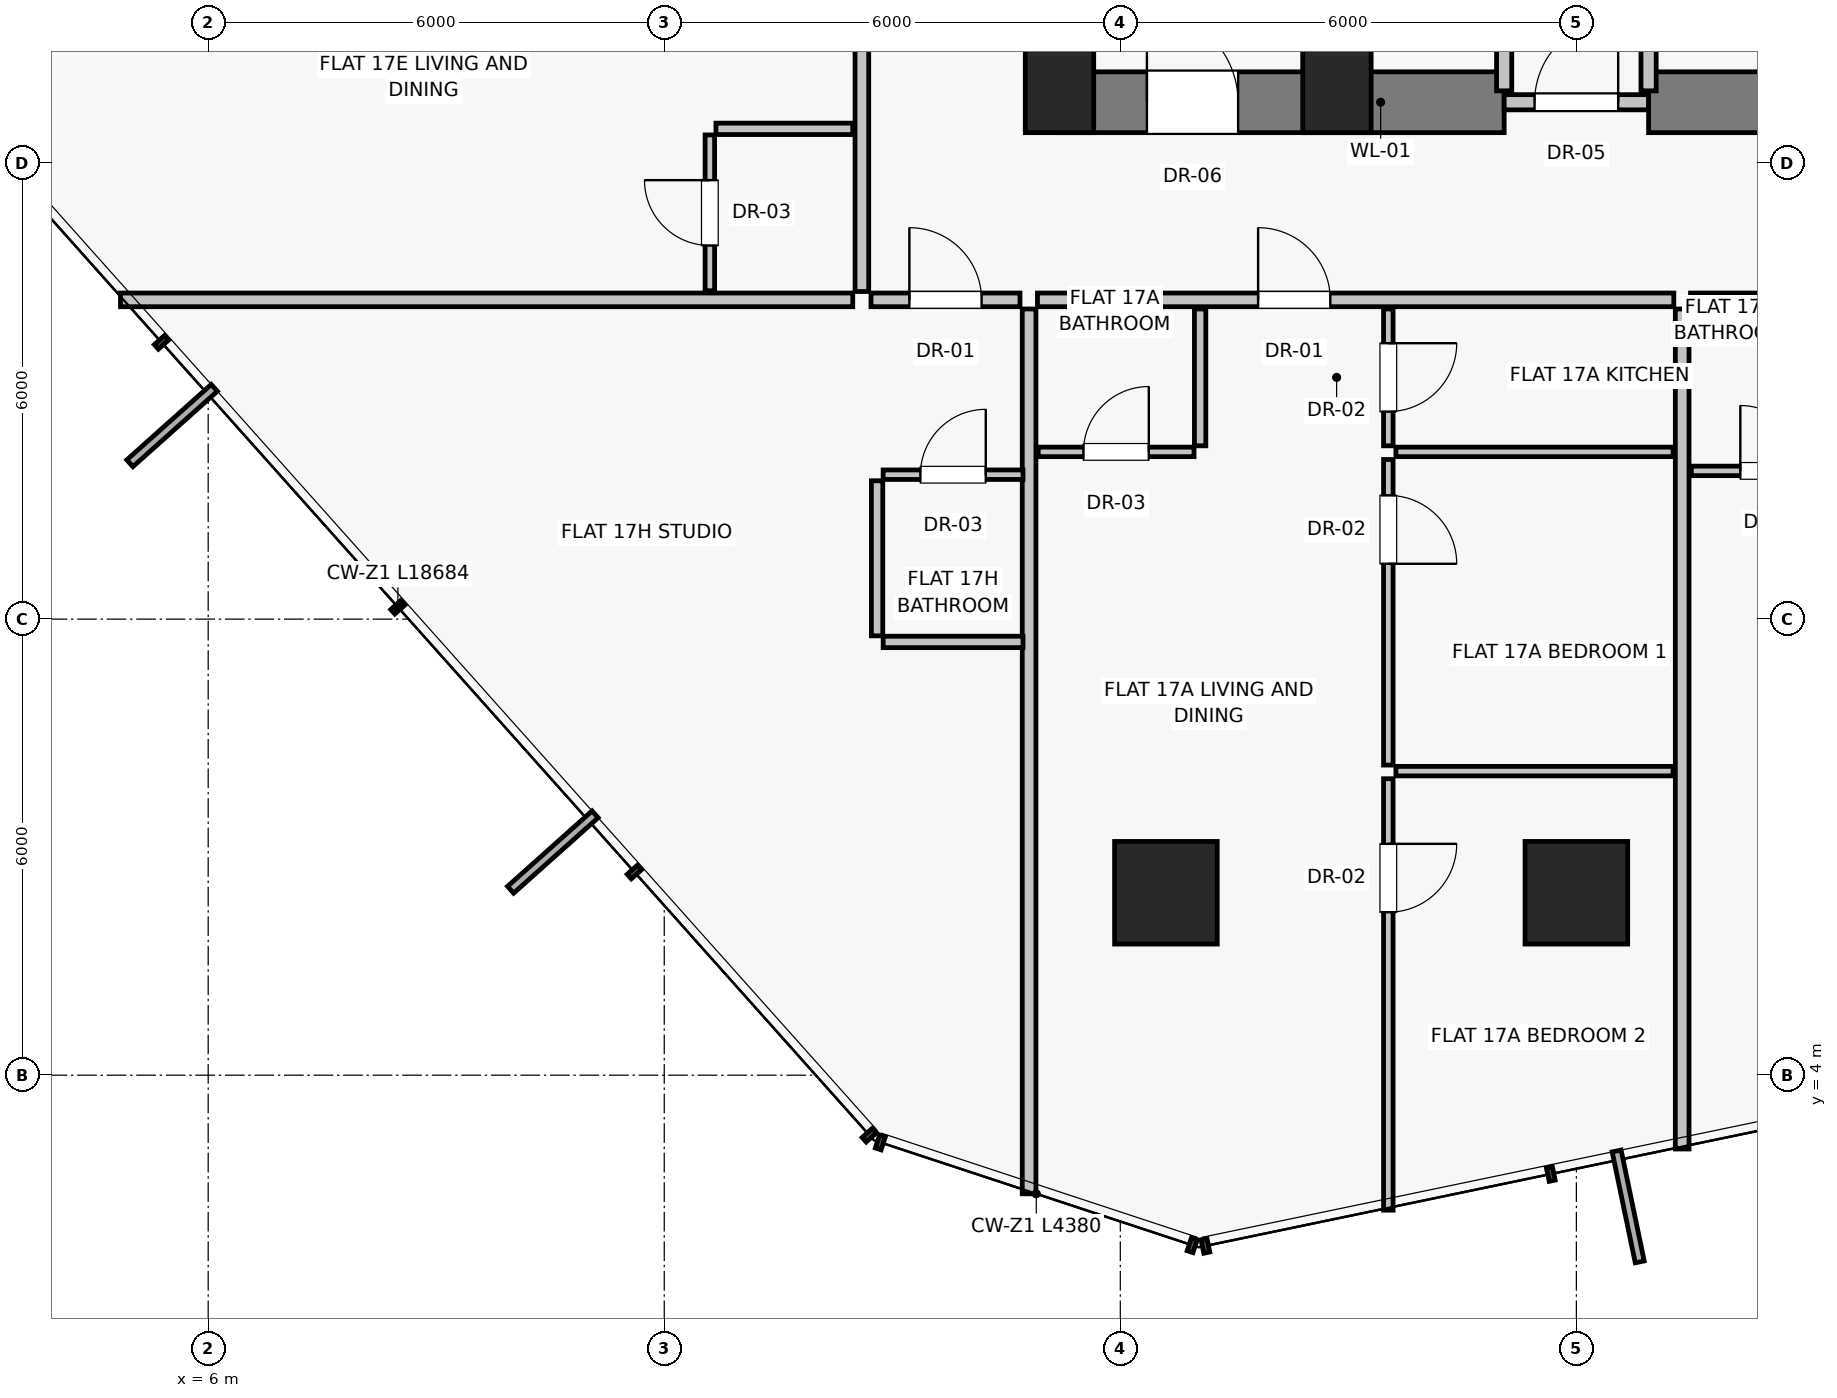
"""IFC4 building model, lengths in metres.
Left out: names, types, materials, properties, quantities, classifications, styles, units other than length and angle.
Written with IfcOpenShell. Run it as: python <this file> out.ifc"""

import sys

from ifc_helpers import new_model, si_unit, direction, frame, frame_2d, origin, origin_2d, place, context, subcontext, project, spatial, rectangle, extrude, source, transform, mapped, element, fill, save


model = new_model("IFC4")
c1 = context("Model", 3, precision=1e-05, world=origin(), true_north=direction((0.0, 1.0)))
c2 = subcontext(c1, "Body", "Model", "MODEL_VIEW")
j1 = project(units=[si_unit("LENGTHUNIT", "METRE"), si_unit("PLANEANGLEUNIT", "RADIAN")], contexts=[c1])
p1 = place(None, origin())
s1 = spatial("IfcSite", under=j1, at=p1, CompositionType="ELEMENT")
p2 = place(p1, origin())
s2 = spatial("IfcBuilding", under=s1, at=p2, CompositionType="ELEMENT")
p3 = place(p2, frame((0.0, 0.0, 64.1)))
s3 = spatial("IfcBuildingStorey", under=s2, at=p3, CompositionType="ELEMENT", Elevation=64.1)
for number, where, z_axis, x_axis in (
    (1, (17.2, 17.0, 0.0), (0.0, 0.0, 1.0), (1.0, 0.0, 0.0)),
    (2, (20.85, 17.0, 0.0), (0.0, 0.0, 1.0), (1.0, 0.0, 0.0)),
):
    element("IfcColumn", number, at=place(p3, frame(where, z_axis=z_axis, x_axis=x_axis)), inside=s3, PredefinedType="PILASTER", context=c2, shape_type="SweptSolid", body=[
        extrude(rectangle(XDim=0.9, YDim=1.2, at=origin_2d()), origin(), (0.0, 0.0, 1.0), 3.25),
    ])
for number, where, z_axis, x_axis in (
    (3, (18.6, 6.4, 0.0), (0.0, 0.0, 1.0), (1.0, 0.0, 0.0)),
    (4, (24.0, 6.4, 0.0), (0.0, 0.0, 1.0), (1.0, 0.0, 0.0)),
):
    element("IfcColumn", number, at=place(p3, frame(where, z_axis=z_axis, x_axis=x_axis)), inside=s3, PredefinedType="COLUMN", context=c2, shape_type="SweptSolid", body=[
        extrude(rectangle(XDim=1.35, YDim=1.35, at=origin_2d()), origin(), (0.0, 0.0, 1.0), 3.25),
    ])
p4 = place(p3, frame((17.2, 16.8, 0.0), z_axis=(0.0, 0.0, 1.0), x_axis=(0.0, 1.0, 0.0)))
e5 = element("IfcWall", 5, at=p4, inside=s3, PredefinedType="SHEAR", context=c2, shape_type="SweptSolid", body=[
    extrude(rectangle(XDim=14.2, YDim=0.8, at=frame_2d((7.1, 0.0))), origin(), (0.0, 0.0, 1.0), 3.0),
])
p5 = place(p3, frame((17.2, 16.8, 0.0), z_axis=(0.0, 0.0, 1.0), x_axis=(1.0, 0.0, 0.0)))
e6 = element("IfcWall", 6, at=p5, inside=s3, PredefinedType="SHEAR", context=c2, shape_type="SweptSolid", body=[
    extrude(rectangle(XDim=5.85, YDim=0.8, at=frame_2d((2.925, 0.0))), origin(), (0.0, 0.0, 1.0), 3.0),
])
p6 = place(p5, frame((1.15, 0.0, 0.0)))
e7 = element("IfcOpeningElement", 7, at=p6, cuts=e6, PredefinedType="OPENING", context=c2, shape_type="SweptSolid", body=[
    extrude(rectangle(XDim=1.2, YDim=2.03, at=frame_2d((0.6, 1.015))), frame((0.0, 0.41, 0.0), z_axis=(0.0, -1.0, 0.0), x_axis=(1.0, 0.0, 0.0)), (0.0, 0.0, 1.0), 0.82),
])
p7 = place(p3, frame((23.05, 16.8, 0.0), z_axis=(0.0, 0.0, 1.0), x_axis=(1.0, 0.0, 0.0)))
e8 = element("IfcWall", 8, at=p7, inside=s3, PredefinedType="SOLIDWALL", context=c2, shape_type="SweptSolid", body=[
    extrude(rectangle(XDim=1.9, YDim=0.2, at=frame_2d((0.95, 0.0))), origin(), (0.0, 0.0, 1.0), 2.15),
])
p8 = place(p7, frame((0.4, 0.0, 0.0)))
e9 = element("IfcOpeningElement", 9, at=p8, cuts=e8, PredefinedType="OPENING", context=c2, shape_type="SweptSolid", body=[
    extrude(rectangle(XDim=1.1, YDim=2.03, at=frame_2d((0.55, 1.015))), frame((0.0, 0.11, 0.0), z_axis=(0.0, -1.0, 0.0), x_axis=(1.0, 0.0, 0.0)), (0.0, 0.0, 1.0), 0.22),
])
p9 = place(p3, frame((24.95, 16.8, 0.0), z_axis=(0.0, 0.0, 1.0), x_axis=(1.0, 0.0, 0.0)))
e10 = element("IfcWall", 10, at=p9, inside=s3, PredefinedType="SHEAR", context=c2, shape_type="SweptSolid", body=[
    extrude(rectangle(XDim=5.85, YDim=0.8, at=frame_2d((2.925, 0.0))), origin(), (0.0, 0.0, 1.0), 3.0),
])
p10 = place(p9, frame((2.15, 0.0, 0.0)))
e11 = element("IfcOpeningElement", 11, at=p10, cuts=e10, PredefinedType="OPENING", context=c2, shape_type="SweptSolid", body=[
    extrude(rectangle(XDim=1.2, YDim=2.03, at=frame_2d((0.6, 1.015))), frame((0.0, 0.41, 0.0), z_axis=(0.0, -1.0, 0.0), x_axis=(1.0, 0.0, 0.0)), (0.0, 0.0, 1.0), 0.82),
])
for number, where, z_axis, x_axis in (
    (12, (23.05, 16.95, 0.0), (0.0, 0.0, 1.0), (0.0, 1.0, 0.0)),
    (13, (24.95, 16.95, 0.0), (0.0, 0.0, 1.0), (0.0, 1.0, 0.0)),
):
    element("IfcWall", number, at=place(p3, frame(where, z_axis=z_axis, x_axis=x_axis)), inside=s3, PredefinedType="SOLIDWALL", context=c2, shape_type="SweptSolid", body=[
        extrude(rectangle(XDim=5.6, YDim=0.2, at=frame_2d((2.8, 0.0))), origin(), (0.0, 0.0, 1.0), 3.0),
    ])
p11 = place(p3, frame((16.8, 14.08, 0.0), z_axis=(0.0, 0.0, 1.0), x_axis=(0.0, -1.0, 0.0)))
e14 = element("IfcWall", 14, at=p11, inside=s3, PredefinedType="PARTITIONING", context=c2, shape_type="SweptSolid", body=[
    extrude(rectangle(XDim=11.641, YDim=0.18, at=frame_2d((5.82, 0.0))), origin(), (0.0, 0.0, 1.0), 3.0),
])
p12 = place(p3, frame((16.91, 14.2, 0.0), z_axis=(0.0, 0.0, 1.0), x_axis=(1.0, 0.0, 0.0)))
e15 = element("IfcWall", 15, at=p12, inside=s3, PredefinedType="PARTITIONING", context=c2, shape_type="SweptSolid", body=[
    extrude(rectangle(XDim=8.372, YDim=0.18, at=frame_2d((4.186, 0.0))), origin(), (0.0, 0.0, 1.0), 3.0),
])
p13 = place(p12, frame((2.903, 0.0, 0.0)))
e16 = element("IfcOpeningElement", 16, at=p13, cuts=e15, PredefinedType="OPENING", context=c2, shape_type="SweptSolid", body=[
    extrude(rectangle(XDim=0.95, YDim=2.02, at=frame_2d((0.475, 1.01))), frame((0.0, 0.1, 0.0), z_axis=(0.0, -1.0, 0.0), x_axis=(1.0, 0.0, 0.0)), (0.0, 0.0, 1.0), 0.2),
])
p14 = place(p3, frame((19.05, 14.08, 0.0), z_axis=(0.0, 0.0, 1.0), x_axis=(0.0, -1.0, 0.0)))
e17 = element("IfcWall", 17, at=p14, inside=s3, PredefinedType="PARTITIONING", context=c2, shape_type="SweptSolid", body=[
    extrude(rectangle(XDim=1.8, YDim=0.15, at=frame_2d((0.9, 0.0))), origin(), (0.0, 0.0, 1.0), 3.0),
])
p15 = place(p3, frame((16.92, 12.2, 0.0), z_axis=(0.0, 0.0, 1.0), x_axis=(1.0, 0.0, 0.0)))
e18 = element("IfcWall", 18, at=p15, inside=s3, PredefinedType="PARTITIONING", context=c2, shape_type="SweptSolid", body=[
    extrude(rectangle(XDim=2.05, YDim=0.125, at=frame_2d((1.025, 0.0))), origin(), (0.0, 0.0, 1.0), 3.0),
])
p16 = place(p15, frame((0.595, 0.0, 0.0)))
e19 = element("IfcOpeningElement", 19, at=p16, cuts=e18, PredefinedType="OPENING", context=c2, shape_type="SweptSolid", body=[
    extrude(rectangle(XDim=0.86, YDim=2.01, at=frame_2d((0.43, 1.005))), frame((0.0, 0.073, 0.0), z_axis=(0.0, -1.0, 0.0), x_axis=(1.0, 0.0, 0.0)), (0.0, 0.0, 1.0), 0.145),
])
p17 = place(p3, frame((21.526, 14.08, 0.0), z_axis=(0.0, 0.0, 1.0), x_axis=(0.0, -1.0, 0.0)))
e20 = element("IfcWall", 20, at=p17, inside=s3, PredefinedType="PARTITIONING", context=c2, shape_type="SweptSolid", body=[
    extrude(rectangle(XDim=1.8, YDim=0.125, at=frame_2d((0.9, 0.0))), origin(), (0.0, 0.0, 1.0), 3.0),
])
p18 = place(p17, frame((0.45, 0.0, 0.0)))
e21 = element("IfcOpeningElement", 21, at=p18, cuts=e20, PredefinedType="OPENING", context=c2, shape_type="SweptSolid", body=[
    extrude(rectangle(XDim=0.9, YDim=2.01, at=frame_2d((0.45, 1.005))), frame((0.0, 0.073, 0.0), z_axis=(0.0, -1.0, 0.0), x_axis=(1.0, 0.0, 0.0)), (0.0, 0.0, 1.0), 0.145),
])
for number, where, z_axis, x_axis in (
    (22, (21.626, 12.2, 0.0), (0.0, 0.0, 1.0), (1.0, 0.0, 0.0)),
    (23, (21.626, 8.0, 0.0), (0.0, 0.0, 1.0), (1.0, 0.0, 0.0)),
):
    element("IfcWall", number, at=place(p3, frame(where, z_axis=z_axis, x_axis=x_axis)), inside=s3, PredefinedType="PARTITIONING", context=c2, shape_type="SweptSolid", body=[
        extrude(rectangle(XDim=3.646, YDim=0.125, at=frame_2d((1.823, 0.0))), origin(), (0.0, 0.0, 1.0), 3.0),
    ])
p19 = place(p3, frame((21.526, 12.1, 0.0), z_axis=(0.0, 0.0, 1.0), x_axis=(0.0, -1.0, 0.0)))
e24 = element("IfcWall", 24, at=p19, inside=s3, PredefinedType="PARTITIONING", context=c2, shape_type="SweptSolid", body=[
    extrude(rectangle(XDim=4.02, YDim=0.125, at=frame_2d((2.01, 0.0))), origin(), (0.0, 0.0, 1.0), 3.0),
])
p20 = place(p19, frame((0.472, 0.0, 0.0)))
e25 = element("IfcOpeningElement", 25, at=p20, cuts=e24, PredefinedType="OPENING", context=c2, shape_type="SweptSolid", body=[
    extrude(rectangle(XDim=0.9, YDim=2.01, at=frame_2d((0.45, 1.005))), frame((0.0, 0.073, 0.0), z_axis=(0.0, -1.0, 0.0), x_axis=(1.0, 0.0, 0.0)), (0.0, 0.0, 1.0), 0.145),
])
p21 = place(p3, frame((21.526, 7.9, 0.0), z_axis=(0.0, 0.0, 1.0), x_axis=(0.0, -1.0, 0.0)))
e26 = element("IfcWall", 26, at=p21, inside=s3, PredefinedType="PARTITIONING", context=c2, shape_type="SweptSolid", body=[
    extrude(rectangle(XDim=5.676, YDim=0.125, at=frame_2d((2.838, 0.0))), origin(), (0.0, 0.0, 1.0), 3.0),
])
p22 = place(p21, frame((0.856, 0.0, 0.0)))
e27 = element("IfcOpeningElement", 27, at=p22, cuts=e26, PredefinedType="OPENING", context=c2, shape_type="SweptSolid", body=[
    extrude(rectangle(XDim=0.9, YDim=2.01, at=frame_2d((0.45, 1.005))), frame((0.0, 0.073, 0.0), z_axis=(0.0, -1.0, 0.0), x_axis=(1.0, 0.0, 0.0)), (0.0, 0.0, 1.0), 0.145),
])
p23 = place(p3, frame((25.392, 14.08, 0.0), z_axis=(0.0, 0.0, 1.0), x_axis=(0.0, -1.0, 0.0)))
e28 = element("IfcWall", 28, at=p23, inside=s3, PredefinedType="PARTITIONING", context=c2, shape_type="SweptSolid", body=[
    extrude(rectangle(XDim=11.051, YDim=0.18, at=frame_2d((5.526, 0.0))), origin(), (0.0, 0.0, 1.0), 3.0),
])
p24 = place(p3, frame((25.502, 14.2, 0.0), z_axis=(0.0, 0.0, 1.0), x_axis=(1.0, 0.0, 0.0)))
e29 = element("IfcWall", 29, at=p24, inside=s3, PredefinedType="PARTITIONING", context=c2, shape_type="SweptSolid", body=[
    extrude(rectangle(XDim=5.588, YDim=0.18, at=frame_2d((2.794, 0.0))), origin(), (0.0, 0.0, 1.0), 3.0),
])
p25 = place(p24, frame((3.336, 0.0, 0.0)))
e30 = element("IfcOpeningElement", 30, at=p25, cuts=e29, PredefinedType="OPENING", context=c2, shape_type="SweptSolid", body=[
    extrude(rectangle(XDim=0.95, YDim=2.02, at=frame_2d((0.475, 1.01))), frame((0.0, 0.1, 0.0), z_axis=(0.0, -1.0, 0.0), x_axis=(1.0, 0.0, 0.0)), (0.0, 0.0, 1.0), 0.2),
])
p26 = place(p3, frame((25.512, 11.95, 0.0), z_axis=(0.0, 0.0, 1.0), x_axis=(1.0, 0.0, 0.0)))
e31 = element("IfcWall", 31, at=p26, inside=s3, PredefinedType="PARTITIONING", context=c2, shape_type="SweptSolid", body=[
    extrude(rectangle(XDim=2.15, YDim=0.125, at=frame_2d((1.075, 0.0))), origin(), (0.0, 0.0, 1.0), 2.58),
])
p27 = place(p26, frame((0.645, 0.0, 0.0)))
e32 = element("IfcOpeningElement", 32, at=p27, cuts=e31, PredefinedType="OPENING", context=c2, shape_type="SweptSolid", body=[
    extrude(rectangle(XDim=0.86, YDim=2.01, at=frame_2d((0.43, 1.005))), frame((0.0, 0.073, 0.0), z_axis=(0.0, -1.0, 0.0), x_axis=(1.0, 0.0, 0.0)), (0.0, 0.0, 1.0), 0.145),
])
p28 = place(p3, frame((14.48, 14.2, 0.0), z_axis=(0.0, 0.0, 1.0), x_axis=(-1.0, 0.0, 0.0)))
e33 = element("IfcWall", 33, at=p28, inside=s3, PredefinedType="PARTITIONING", context=c2, shape_type="SweptSolid", body=[
    extrude(rectangle(XDim=9.634, YDim=0.18, at=frame_2d((4.817, 0.0))), origin(), (0.0, 0.0, 1.0), 3.0),
])
p29 = place(p3, frame((14.6, 14.31, 0.0), z_axis=(0.0, 0.0, 1.0), x_axis=(0.0, 1.0, 0.0)))
e34 = element("IfcWall", 34, at=p29, inside=s3, PredefinedType="PARTITIONING", context=c2, shape_type="SweptSolid", body=[
    extrude(rectangle(XDim=11.438, YDim=0.18, at=frame_2d((5.719, 0.0))), origin(), (0.0, 0.0, 1.0), 3.0),
])
p30 = place(p29, frame((3.804, 0.0, 0.0)))
e35 = element("IfcOpeningElement", 35, at=p30, cuts=e34, PredefinedType="OPENING", context=c2, shape_type="SweptSolid", body=[
    extrude(rectangle(XDim=0.95, YDim=2.02, at=frame_2d((0.475, 1.01))), frame((0.0, 0.1, 0.0), z_axis=(0.0, -1.0, 0.0), x_axis=(1.0, 0.0, 0.0)), (0.0, 0.0, 1.0), 0.2),
])
p31 = place(p3, frame((14.48, 16.45, 0.0), z_axis=(0.0, 0.0, 1.0), x_axis=(-1.0, 0.0, 0.0)))
e36 = element("IfcWall", 36, at=p31, inside=s3, PredefinedType="PARTITIONING", context=c2, shape_type="SweptSolid", body=[
    extrude(rectangle(XDim=1.8, YDim=0.15, at=frame_2d((0.9, 0.0))), origin(), (0.0, 0.0, 1.0), 3.0),
])
p32 = place(p3, frame((12.6, 14.32, 0.0), z_axis=(0.0, 0.0, 1.0), x_axis=(0.0, 1.0, 0.0)))
e37 = element("IfcWall", 37, at=p32, inside=s3, PredefinedType="PARTITIONING", context=c2, shape_type="SweptSolid", body=[
    extrude(rectangle(XDim=2.05, YDim=0.125, at=frame_2d((1.025, 0.0))), origin(), (0.0, 0.0, 1.0), 3.0),
])
p33 = place(p32, frame((0.595, 0.0, 0.0)))
e38 = element("IfcOpeningElement", 38, at=p33, cuts=e37, PredefinedType="OPENING", context=c2, shape_type="SweptSolid", body=[
    extrude(rectangle(XDim=0.86, YDim=2.01, at=frame_2d((0.43, 1.005))), frame((0.0, 0.073, 0.0), z_axis=(0.0, -1.0, 0.0), x_axis=(1.0, 0.0, 0.0)), (0.0, 0.0, 1.0), 0.145),
])
p34 = place(p3, frame((14.72, 14.2, 0.0), z_axis=(0.0, 0.0, 1.0), x_axis=(1.0, 0.0, 0.0)))
e39 = element("IfcWall", 39, at=p34, inside=s3, PredefinedType="PARTITIONING", context=c2, shape_type="SweptSolid", body=[
    extrude(rectangle(XDim=1.96, YDim=0.18, at=frame_2d((0.98, 0.0))), origin(), (0.0, 0.0, 1.0), 3.0),
])
p35 = place(p34, frame((0.505, 0.0, 0.0)))
e40 = element("IfcOpeningElement", 40, at=p35, cuts=e39, PredefinedType="OPENING", context=c2, shape_type="SweptSolid", body=[
    extrude(rectangle(XDim=0.95, YDim=2.02, at=frame_2d((0.475, 1.01))), frame((0.0, 0.1, 0.0), z_axis=(0.0, -1.0, 0.0), x_axis=(1.0, 0.0, 0.0)), (0.0, 0.0, 1.0), 0.2),
])
p36 = place(p3, frame((14.88, 11.9, 0.0), z_axis=(0.0, 0.0, 1.0), x_axis=(1.0, 0.0, 0.0)))
e41 = element("IfcWall", 41, at=p36, inside=s3, PredefinedType="PARTITIONING", context=c2, shape_type="SweptSolid", body=[
    extrude(rectangle(XDim=1.84, YDim=0.125, at=frame_2d((0.92, 0.0))), origin(), (0.0, 0.0, 1.0), 3.0),
])
p37 = place(p36, frame((0.49, 0.0, 0.0)))
e42 = element("IfcOpeningElement", 42, at=p37, cuts=e41, PredefinedType="OPENING", context=c2, shape_type="SweptSolid", body=[
    extrude(rectangle(XDim=0.86, YDim=2.01, at=frame_2d((0.43, 1.005))), frame((0.0, 0.073, 0.0), z_axis=(0.0, -1.0, 0.0), x_axis=(1.0, 0.0, 0.0)), (0.0, 0.0, 1.0), 0.145),
])
p38 = place(p3, frame((14.88, 9.7, 0.0), z_axis=(0.0, 0.0, 1.0), x_axis=(1.0, 0.0, 0.0)))
e43 = element("IfcWall", 43, at=p38, inside=s3, PredefinedType="PARTITIONING", context=c2, shape_type="SweptSolid", body=[
    extrude(rectangle(XDim=1.84, YDim=0.15, at=frame_2d((0.92, 0.0))), origin(), (0.0, 0.0, 1.0), 3.0),
])
p39 = place(p3, frame((14.8, 9.78, 0.0), z_axis=(0.0, 0.0, 1.0), x_axis=(0.0, 1.0, 0.0)))
e44 = element("IfcWall", 44, at=p39, inside=s3, PredefinedType="PARTITIONING", context=c2, shape_type="SweptSolid", body=[
    extrude(rectangle(XDim=2.04, YDim=0.15, at=frame_2d((1.02, 0.0))), origin(), (0.0, 0.0, 1.0), 3.0),
])
m1 = source(origin(), c2, "Body", "SweptSolid", [
    extrude(rectangle(XDim=1.2, YDim=2.03, at=frame_2d((0.6, 1.015))), frame((0.0, 0.025, 0.0), z_axis=(0.0, -1.0, 0.0), x_axis=(1.0, 0.0, 0.0)), (0.0, 0.0, 1.0), 0.05),
])
p40 = place(p6, origin())
e45 = element("IfcDoor", 45, at=p40, inside=s3, OperationType="SINGLE_SWING_LEFT", PredefinedType="DOOR", context=c2, shape_type="MappedRepresentation", body=[
    mapped(m1, transform((0.0, 0.0, 0.0), scale=1.0)),
])
fill(e7, e45)
m2 = source(origin(), c2, "Body", "SweptSolid", [
    extrude(rectangle(XDim=1.1, YDim=2.03, at=frame_2d((0.55, 1.015))), frame((0.0, 0.025, 0.0), z_axis=(0.0, -1.0, 0.0), x_axis=(1.0, 0.0, 0.0)), (0.0, 0.0, 1.0), 0.05),
])
p41 = place(p8, origin())
e46 = element("IfcDoor", 46, at=p41, inside=s3, OperationType="SINGLE_SWING_RIGHT", PredefinedType="DOOR", context=c2, shape_type="MappedRepresentation", body=[
    mapped(m2, transform((0.0, 0.0, 0.0), scale=1.0)),
])
fill(e9, e46)
m3 = source(origin(), c2, "Body", "SweptSolid", [
    extrude(rectangle(XDim=0.95, YDim=2.02, at=frame_2d((0.475, 1.01))), frame((0.0, 0.025, 0.0), z_axis=(0.0, -1.0, 0.0), x_axis=(1.0, 0.0, 0.0)), (0.0, 0.0, 1.0), 0.05),
])
p42 = place(p13, origin())
e47 = element("IfcDoor", 47, at=p42, inside=s3, OperationType="SINGLE_SWING_LEFT", PredefinedType="DOOR", context=c2, shape_type="MappedRepresentation", body=[
    mapped(m3, transform((0.0, 0.0, 0.0), scale=1.0)),
])
fill(e16, e47)
m4 = source(origin(), c2, "Body", "SweptSolid", [
    extrude(rectangle(XDim=0.86, YDim=2.01, at=frame_2d((0.43, 1.005))), frame((0.0, 0.025, 0.0), z_axis=(0.0, -1.0, 0.0), x_axis=(1.0, 0.0, 0.0)), (0.0, 0.0, 1.0), 0.05),
])
p43 = place(p16, origin())
e48 = element("IfcDoor", 48, at=p43, inside=s3, OperationType="SINGLE_SWING_RIGHT", PredefinedType="DOOR", context=c2, shape_type="MappedRepresentation", body=[
    mapped(m4, transform((0.0, 0.0, 0.0), scale=1.0)),
])
fill(e19, e48)
m5 = source(origin(), c2, "Body", "SweptSolid", [
    extrude(rectangle(XDim=0.9, YDim=2.01, at=frame_2d((0.45, 1.005))), frame((0.0, 0.025, 0.0), z_axis=(0.0, -1.0, 0.0), x_axis=(1.0, 0.0, 0.0)), (0.0, 0.0, 1.0), 0.05),
])
p44 = place(p18, origin())
e49 = element("IfcDoor", 49, at=p44, inside=s3, OperationType="SINGLE_SWING_LEFT", PredefinedType="DOOR", context=c2, shape_type="MappedRepresentation", body=[
    mapped(m5, transform((0.0, 0.0, 0.0), scale=1.0)),
])
fill(e21, e49)
p45 = place(p20, origin())
e50 = element("IfcDoor", 50, at=p45, inside=s3, OperationType="SINGLE_SWING_RIGHT", PredefinedType="DOOR", context=c2, shape_type="MappedRepresentation", body=[
    mapped(m5, transform((0.0, 0.0, 0.0), scale=1.0)),
])
fill(e25, e50)
p46 = place(p22, origin())
e51 = element("IfcDoor", 51, at=p46, inside=s3, OperationType="SINGLE_SWING_LEFT", PredefinedType="DOOR", context=c2, shape_type="MappedRepresentation", body=[
    mapped(m5, transform((0.0, 0.0, 0.0), scale=1.0)),
])
fill(e27, e51)
p47 = place(p27, origin())
e52 = element("IfcDoor", 52, at=p47, inside=s3, OperationType="SINGLE_SWING_LEFT", PredefinedType="DOOR", context=c2, shape_type="MappedRepresentation", body=[
    mapped(m4, transform((0.0, 0.0, 0.0), scale=1.0)),
])
fill(e32, e52)
p48 = place(p33, origin())
e53 = element("IfcDoor", 53, at=p48, inside=s3, OperationType="SINGLE_SWING_RIGHT", PredefinedType="DOOR", context=c2, shape_type="MappedRepresentation", body=[
    mapped(m4, transform((0.0, 0.0, 0.0), scale=1.0)),
])
fill(e38, e53)
p49 = place(p35, origin())
e54 = element("IfcDoor", 54, at=p49, inside=s3, OperationType="SINGLE_SWING_LEFT", PredefinedType="DOOR", context=c2, shape_type="MappedRepresentation", body=[
    mapped(m3, transform((0.0, 0.0, 0.0), scale=1.0)),
])
fill(e40, e54)
p50 = place(p37, origin())
e55 = element("IfcDoor", 55, at=p50, inside=s3, OperationType="SINGLE_SWING_RIGHT", PredefinedType="DOOR", context=c2, shape_type="MappedRepresentation", body=[
    mapped(m4, transform((0.0, 0.0, 0.0), scale=1.0)),
])
fill(e42, e55)
save(model, sys.argv[1])
